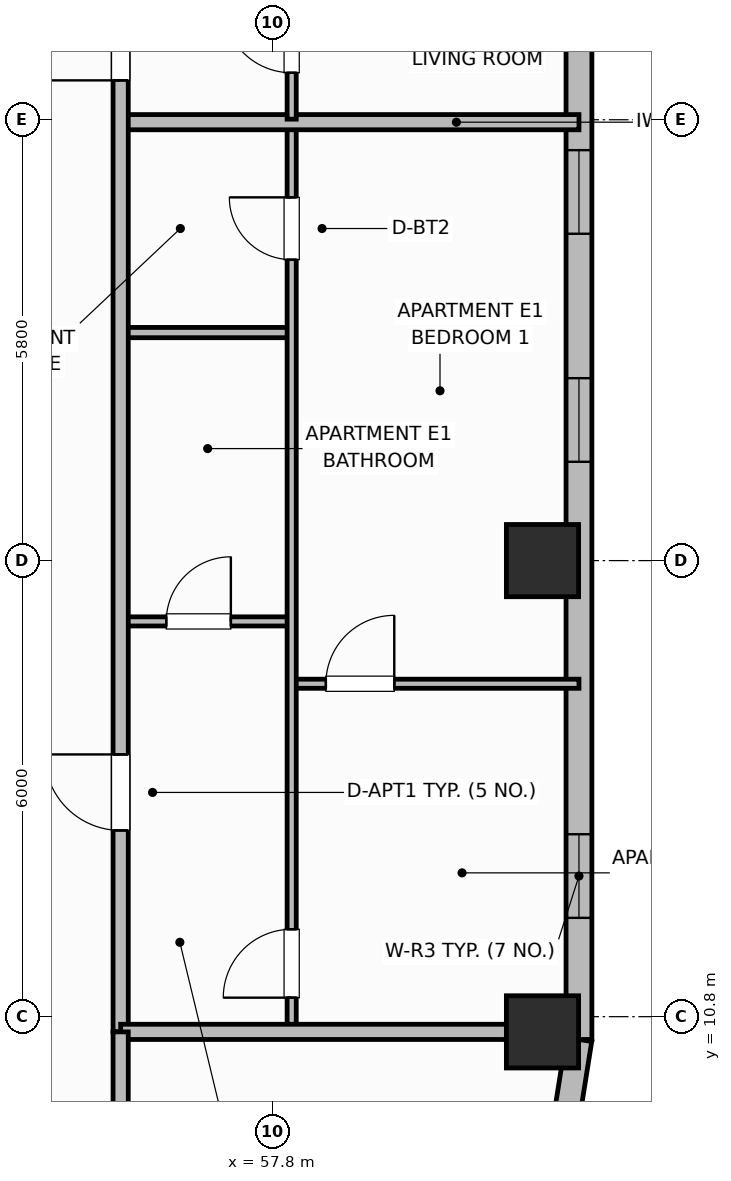
"""IFC4 building model, lengths in metres.
Left out: names, types, materials, properties, quantities, classifications, styles, units other than length and angle.
Written with IfcOpenShell. Run it as: python <this file> out.ifc"""

import sys

from ifc_helpers import new_model, si_unit, direction, frame, frame_2d, origin, origin_2d, place, context, subcontext, project, spatial, rectangle, extrude, element, fill, save


model = new_model("IFC4")
c1 = context("Model", 3, precision=1e-05, world=origin(), true_north=direction((0.0, 1.0)))
c2 = subcontext(c1, "Body", "Model", "MODEL_VIEW")
j1 = project(units=[si_unit("LENGTHUNIT", "METRE"), si_unit("PLANEANGLEUNIT", "RADIAN")], contexts=[c1])
p1 = place(None, origin())
s1 = spatial("IfcSite", under=j1, at=p1, CompositionType="ELEMENT")
p2 = place(p1, origin())
s2 = spatial("IfcBuilding", under=s1, at=p2, CompositionType="ELEMENT")
p3 = place(p2, frame((0.0, 0.0, 151.5)))
s3 = spatial("IfcBuildingStorey", under=s2, at=p3, CompositionType="ELEMENT", Elevation=151.5)
for number, where, z_axis, x_axis in (
    (1, (61.35, 10.6, 0.0), (0.0, 0.0, 1.0), (1.0, 0.0, 0.0)),
    (2, (61.35, 16.8, 0.0), (0.0, 0.0, 1.0), (1.0, 0.0, 0.0)),
):
    element("IfcColumn", number, at=place(p3, frame(where, z_axis=z_axis, x_axis=x_axis)), inside=s3, PredefinedType="COLUMN", context=c2, shape_type="SweptSolid", body=[
        extrude(rectangle(XDim=0.95, YDim=0.95, at=origin_2d()), origin(), (0.0, 0.0, 1.0), 3.7),
    ])
p4 = place(p3, frame((61.652, 9.378, 0.0), z_axis=(0.0, 0.0, 1.0), x_axis=(0.156514556949, 0.987675651954, 0.0)))
e3 = element("IfcWall", 3, at=p4, inside=s3, PredefinedType="SOLIDWALL", context=c2, shape_type="SweptSolid", body=[
    extrude(rectangle(XDim=1.135, YDim=0.34, at=frame_2d((0.568, 0.0))), origin(), (0.0, 0.0, 1.0), 2.72),
])
p5 = place(p3, frame((61.83, 10.5, 0.0), z_axis=(0.0, 0.0, 1.0), x_axis=(0.0, 1.0, 0.0)))
e4 = element("IfcWall", 4, at=p5, inside=s3, PredefinedType="SOLIDWALL", context=c2, shape_type="SweptSolid", body=[
    extrude(rectangle(XDim=13.3, YDim=0.34, at=frame_2d((6.65, 0.0))), origin(), (0.0, 0.0, 1.0), 2.72),
])
p6 = place(p5, frame((1.6, 0.0, 0.95)))
e5 = element("IfcOpeningElement", 5, at=p6, cuts=e4, PredefinedType="OPENING", context=c2, shape_type="SweptSolid", body=[
    extrude(rectangle(XDim=1.1, YDim=1.65, at=frame_2d((0.55, 0.825))), frame((0.0, 0.18, 0.0), z_axis=(0.0, -1.0, 0.0), x_axis=(1.0, 0.0, 0.0)), (0.0, 0.0, 1.0), 0.36),
])
p7 = place(p5, frame((7.6, 0.0, 0.95)))
e6 = element("IfcOpeningElement", 6, at=p7, cuts=e4, PredefinedType="OPENING", context=c2, shape_type="SweptSolid", body=[
    extrude(rectangle(XDim=1.1, YDim=1.65, at=frame_2d((0.55, 0.825))), frame((0.0, 0.18, 0.0), z_axis=(0.0, -1.0, 0.0), x_axis=(1.0, 0.0, 0.0)), (0.0, 0.0, 1.0), 0.36),
])
p8 = place(p5, frame((10.6, 0.0, 0.95)))
e7 = element("IfcOpeningElement", 7, at=p8, cuts=e4, PredefinedType="OPENING", context=c2, shape_type="SweptSolid", body=[
    extrude(rectangle(XDim=1.1, YDim=1.65, at=frame_2d((0.55, 0.825))), frame((0.0, 0.18, 0.0), z_axis=(0.0, -1.0, 0.0), x_axis=(1.0, 0.0, 0.0)), (0.0, 0.0, 1.0), 0.36),
])
p9 = place(p3, frame((55.8, 16.0, 0.0), z_axis=(0.0, 0.0, 1.0), x_axis=(1.0, 0.0, 0.0)))
e8 = element("IfcWall", 8, at=p9, inside=s3, PredefinedType="PARTITIONING", context=c2, shape_type="SweptSolid", body=[
    extrude(rectangle(XDim=2.25, YDim=0.12, at=frame_2d((1.125, 0.0))), origin(), (0.0, 0.0, 1.0), 2.55),
])
p10 = place(p9, frame((0.6, 0.0, 0.0)))
e9 = element("IfcOpeningElement", 9, at=p10, cuts=e8, PredefinedType="OPENING", context=c2, shape_type="SweptSolid", body=[
    extrude(rectangle(XDim=0.85, YDim=2.1, at=frame_2d((0.425, 1.05))), frame((0.0, 0.07, 0.0), z_axis=(0.0, -1.0, 0.0), x_axis=(1.0, 0.0, 0.0)), (0.0, 0.0, 1.0), 0.14),
])
p11 = place(p3, frame((55.8, 19.8, 0.0), z_axis=(0.0, 0.0, 1.0), x_axis=(1.0, 0.0, 0.0)))
e10 = element("IfcWall", 10, at=p11, inside=s3, PredefinedType="PARTITIONING", context=c2, shape_type="SweptSolid", body=[
    extrude(rectangle(XDim=2.25, YDim=0.135, at=frame_2d((1.125, 0.0))), origin(), (0.0, 0.0, 1.0), 2.55),
])
p12 = place(p3, frame((58.05, 15.18, 0.0), z_axis=(0.0, 0.0, 1.0), x_axis=(1.0, 0.0, 0.0)))
e11 = element("IfcWall", 11, at=p12, inside=s3, PredefinedType="PARTITIONING", context=c2, shape_type="SweptSolid", body=[
    extrude(rectangle(XDim=3.78, YDim=0.12, at=frame_2d((1.89, 0.0))), origin(), (0.0, 0.0, 1.0), 2.55),
])
p13 = place(p12, frame((0.45, 0.0, 0.0)))
e12 = element("IfcOpeningElement", 12, at=p13, cuts=e11, PredefinedType="OPENING", context=c2, shape_type="SweptSolid", body=[
    extrude(rectangle(XDim=0.9, YDim=2.1, at=frame_2d((0.45, 1.05))), frame((0.0, 0.07, 0.0), z_axis=(0.0, -1.0, 0.0), x_axis=(1.0, 0.0, 0.0)), (0.0, 0.0, 1.0), 0.14),
])
p14 = place(p3, frame((58.05, 10.64, 0.0), z_axis=(0.0, 0.0, 1.0), x_axis=(0.0, 1.0, 0.0)))
e13 = element("IfcWall", 13, at=p14, inside=s3, PredefinedType="PARTITIONING", context=c2, shape_type="SweptSolid", body=[
    extrude(rectangle(XDim=11.888, YDim=0.12, at=frame_2d((5.944, 0.0))), origin(), (0.0, 0.0, 1.0), 2.55),
])
p15 = place(p14, frame((0.41, 0.0, 0.0)))
e14 = element("IfcOpeningElement", 14, at=p15, cuts=e13, PredefinedType="OPENING", context=c2, shape_type="SweptSolid", body=[
    extrude(rectangle(XDim=0.9, YDim=2.1, at=frame_2d((0.45, 1.05))), frame((0.0, 0.07, 0.0), z_axis=(0.0, -1.0, 0.0), x_axis=(1.0, 0.0, 0.0)), (0.0, 0.0, 1.0), 0.14),
])
p16 = place(p14, frame((10.119, 0.0, 0.0)))
e15 = element("IfcOpeningElement", 15, at=p16, cuts=e13, PredefinedType="OPENING", context=c2, shape_type="SweptSolid", body=[
    extrude(rectangle(XDim=0.82, YDim=2.08, at=frame_2d((0.41, 1.04))), frame((0.0, 0.07, 0.0), z_axis=(0.0, -1.0, 0.0), x_axis=(1.0, 0.0, 0.0)), (0.0, 0.0, 1.0), 0.14),
])
p17 = place(p3, frame((55.8, 22.568, 0.0), z_axis=(0.0, 0.0, 1.0), x_axis=(1.0, 0.0, 0.0)))
e16 = element("IfcWall", 16, at=p17, inside=s3, PredefinedType="PARTITIONING", context=c2, shape_type="SweptSolid", body=[
    extrude(rectangle(XDim=6.03, YDim=0.2, at=frame_2d((3.015, 0.0))), origin(), (0.0, 0.0, 1.0), 2.55),
])
p18 = place(p3, frame((58.05, 22.608, 0.0), z_axis=(0.0, 0.0, 1.0), x_axis=(0.0, 1.0, 0.0)))
e17 = element("IfcWall", 17, at=p18, inside=s3, PredefinedType="PARTITIONING", context=c2, shape_type="SweptSolid", body=[
    extrude(rectangle(XDim=11.052, YDim=0.12, at=frame_2d((5.526, 0.0))), origin(), (0.0, 0.0, 1.0), 2.55),
])
p19 = place(p18, frame((0.61, 0.0, 0.0)))
e18 = element("IfcOpeningElement", 18, at=p19, cuts=e17, PredefinedType="OPENING", context=c2, shape_type="SweptSolid", body=[
    extrude(rectangle(XDim=0.9, YDim=2.1, at=frame_2d((0.45, 1.05))), frame((0.0, 0.07, 0.0), z_axis=(0.0, -1.0, 0.0), x_axis=(1.0, 0.0, 0.0)), (0.0, 0.0, 1.0), 0.14),
])
p20 = place(p3, frame((55.8, 10.6, 0.0), z_axis=(0.0, 0.0, 1.0), x_axis=(0.0, 1.0, 0.0)))
e19 = element("IfcWall", 19, at=p20, inside=s3, PredefinedType="PARTITIONING", context=c2, shape_type="SweptSolid", body=[
    extrude(rectangle(XDim=35.2, YDim=0.2, at=frame_2d((17.6, 0.0))), origin(), (0.0, 0.0, 1.0), 2.55),
])
p21 = place(p20, frame((2.65, 0.0, 0.0)))
e20 = element("IfcOpeningElement", 20, at=p21, cuts=e19, PredefinedType="OPENING", context=c2, shape_type="SweptSolid", body=[
    extrude(rectangle(XDim=1.0, YDim=2.15, at=frame_2d((0.5, 1.075))), frame((0.0, 0.11, 0.0), z_axis=(0.0, -1.0, 0.0), x_axis=(1.0, 0.0, 0.0)), (0.0, 0.0, 1.0), 0.22),
])
p22 = place(p20, frame((12.518, 0.0, 0.0)))
e21 = element("IfcOpeningElement", 21, at=p22, cuts=e19, PredefinedType="OPENING", context=c2, shape_type="SweptSolid", body=[
    extrude(rectangle(XDim=1.0, YDim=2.15, at=frame_2d((0.5, 1.075))), frame((0.0, 0.11, 0.0), z_axis=(0.0, -1.0, 0.0), x_axis=(1.0, 0.0, 0.0)), (0.0, 0.0, 1.0), 0.22),
])
p23 = place(p20, frame((23.65, 0.0, 0.0)))
e22 = element("IfcOpeningElement", 22, at=p23, cuts=e19, PredefinedType="OPENING", context=c2, shape_type="SweptSolid", body=[
    extrude(rectangle(XDim=1.0, YDim=2.15, at=frame_2d((0.5, 1.075))), frame((0.0, 0.11, 0.0), z_axis=(0.0, -1.0, 0.0), x_axis=(1.0, 0.0, 0.0)), (0.0, 0.0, 1.0), 0.22),
])
p24 = place(p3, frame((55.8, 10.6, 0.0), z_axis=(0.0, 0.0, 1.0), x_axis=(1.0, 0.0, 0.0)))
e23 = element("IfcWall", 23, at=p24, inside=s3, PredefinedType="PARTITIONING", context=c2, shape_type="SweptSolid", body=[
    extrude(rectangle(XDim=5.61, YDim=0.2, at=frame_2d((2.805, 0.0))), origin(), (0.0, 0.0, 1.0), 2.55),
])
p25 = place(p3, frame((55.8, 6.87, 0.0), z_axis=(0.0, 0.0, 1.0), x_axis=(0.0, 1.0, 0.0)))
e24 = element("IfcWall", 24, at=p25, inside=s3, PredefinedType="PARTITIONING", context=c2, shape_type="SweptSolid", body=[
    extrude(rectangle(XDim=3.73, YDim=0.2, at=frame_2d((1.865, 0.0))), origin(), (0.0, 0.0, 1.0), 2.55),
])
p26 = place(p6, origin())
e25 = element("IfcWindow", 25, at=p26, inside=s3, PartitioningType="SINGLE_PANEL", PredefinedType="WINDOW", context=c2, shape_type="SweptSolid", body=[
    extrude(rectangle(XDim=1.1, YDim=1.65, at=frame_2d((0.55, 0.825))), frame((0.0, 0.03, 0.0), z_axis=(0.0, -1.0, 0.0), x_axis=(1.0, 0.0, 0.0)), (0.0, 0.0, 1.0), 0.06),
])
fill(e5, e25)
p27 = place(p7, origin())
e26 = element("IfcWindow", 26, at=p27, inside=s3, PartitioningType="SINGLE_PANEL", PredefinedType="WINDOW", context=c2, shape_type="SweptSolid", body=[
    extrude(rectangle(XDim=1.1, YDim=1.65, at=frame_2d((0.55, 0.825))), frame((0.0, 0.03, 0.0), z_axis=(0.0, -1.0, 0.0), x_axis=(1.0, 0.0, 0.0)), (0.0, 0.0, 1.0), 0.06),
])
fill(e6, e26)
p28 = place(p8, origin())
e27 = element("IfcWindow", 27, at=p28, inside=s3, PartitioningType="SINGLE_PANEL", PredefinedType="WINDOW", context=c2, shape_type="SweptSolid", body=[
    extrude(rectangle(XDim=1.1, YDim=1.65, at=frame_2d((0.55, 0.825))), frame((0.0, 0.03, 0.0), z_axis=(0.0, -1.0, 0.0), x_axis=(1.0, 0.0, 0.0)), (0.0, 0.0, 1.0), 0.06),
])
fill(e7, e27)
p29 = place(p10, origin())
e28 = element("IfcDoor", 28, at=p29, inside=s3, OperationType="SINGLE_SWING_RIGHT", PredefinedType="DOOR", context=c2, shape_type="SweptSolid", body=[
    extrude(rectangle(XDim=0.85, YDim=2.1, at=frame_2d((0.425, 1.05))), frame((0.0, 0.025, 0.0), z_axis=(0.0, -1.0, 0.0), x_axis=(1.0, 0.0, 0.0)), (0.0, 0.0, 1.0), 0.05),
])
fill(e9, e28)
p30 = place(p13, origin())
e29 = element("IfcDoor", 29, at=p30, inside=s3, OperationType="SINGLE_SWING_RIGHT", PredefinedType="DOOR", context=c2, shape_type="SweptSolid", body=[
    extrude(rectangle(XDim=0.9, YDim=2.1, at=frame_2d((0.45, 1.05))), frame((0.0, 0.025, 0.0), z_axis=(0.0, -1.0, 0.0), x_axis=(1.0, 0.0, 0.0)), (0.0, 0.0, 1.0), 0.05),
])
fill(e12, e29)
p31 = place(p15, origin())
e30 = element("IfcDoor", 30, at=p31, inside=s3, OperationType="SINGLE_SWING_LEFT", PredefinedType="DOOR", context=c2, shape_type="SweptSolid", body=[
    extrude(rectangle(XDim=0.9, YDim=2.1, at=frame_2d((0.45, 1.05))), frame((0.0, 0.025, 0.0), z_axis=(0.0, -1.0, 0.0), x_axis=(1.0, 0.0, 0.0)), (0.0, 0.0, 1.0), 0.05),
])
fill(e14, e30)
p32 = place(p16, origin())
e31 = element("IfcDoor", 31, at=p32, inside=s3, OperationType="SINGLE_SWING_RIGHT", PredefinedType="DOOR", context=c2, shape_type="SweptSolid", body=[
    extrude(rectangle(XDim=0.82, YDim=2.08, at=frame_2d((0.41, 1.04))), frame((0.0, 0.025, 0.0), z_axis=(0.0, -1.0, 0.0), x_axis=(1.0, 0.0, 0.0)), (0.0, 0.0, 1.0), 0.05),
])
fill(e15, e31)
p33 = place(p19, origin())
e32 = element("IfcDoor", 32, at=p33, inside=s3, OperationType="SINGLE_SWING_RIGHT", PredefinedType="DOOR", context=c2, shape_type="SweptSolid", body=[
    extrude(rectangle(XDim=0.9, YDim=2.1, at=frame_2d((0.45, 1.05))), frame((0.0, 0.025, 0.0), z_axis=(0.0, -1.0, 0.0), x_axis=(1.0, 0.0, 0.0)), (0.0, 0.0, 1.0), 0.05),
])
fill(e18, e32)
p34 = place(p21, origin())
e33 = element("IfcDoor", 33, at=p34, inside=s3, OperationType="SINGLE_SWING_RIGHT", PredefinedType="DOOR", context=c2, shape_type="SweptSolid", body=[
    extrude(rectangle(XDim=1.0, YDim=2.15, at=frame_2d((0.5, 1.075))), frame((0.0, 0.025, 0.0), z_axis=(0.0, -1.0, 0.0), x_axis=(1.0, 0.0, 0.0)), (0.0, 0.0, 1.0), 0.05),
])
fill(e20, e33)
p35 = place(p22, origin())
e34 = element("IfcDoor", 34, at=p35, inside=s3, OperationType="SINGLE_SWING_LEFT", PredefinedType="DOOR", context=c2, shape_type="SweptSolid", body=[
    extrude(rectangle(XDim=1.0, YDim=2.15, at=frame_2d((0.5, 1.075))), frame((0.0, 0.025, 0.0), z_axis=(0.0, -1.0, 0.0), x_axis=(1.0, 0.0, 0.0)), (0.0, 0.0, 1.0), 0.05),
])
fill(e21, e34)
save(model, sys.argv[1])
